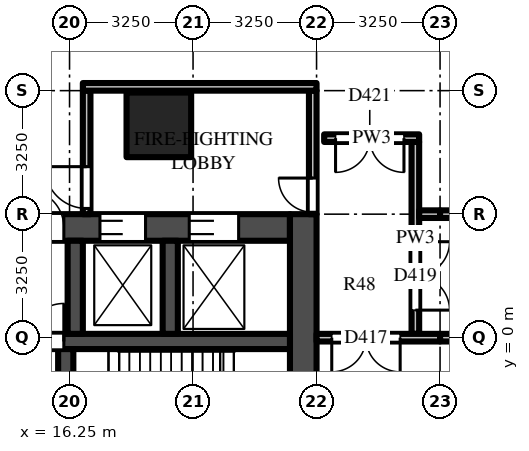
"""IFC4 building model, lengths in metres.
Left out: names, types, materials, properties, quantities, classifications, styles, units other than length and angle.
Written with IfcOpenShell. Run it as: python <this file> out.ifc"""

import sys

from ifc_helpers import new_model, si_unit, direction, frame, frame_2d, origin, origin_2d, place, context, subcontext, project, spatial, rectangle, extrude, source, transform, mapped, element, fill, save


model = new_model("IFC4")
c1 = context("Model", 3, precision=1e-05, world=origin(), true_north=direction((0.0, 1.0)))
c2 = subcontext(c1, "Body", "Model", "MODEL_VIEW")
j1 = project(units=[si_unit("LENGTHUNIT", "METRE"), si_unit("PLANEANGLEUNIT", "RADIAN")], contexts=[c1])
p1 = place(None, origin())
s1 = spatial("IfcSite", under=j1, at=p1, CompositionType="ELEMENT")
p2 = place(p1, origin())
s2 = spatial("IfcBuilding", under=s1, at=p2, CompositionType="ELEMENT")
p3 = place(p2, origin())
s3 = spatial("IfcBuildingStorey", under=s2, at=p3, CompositionType="ELEMENT", Elevation=0.0)
m1 = source(origin(), c2, "Body", "SweptSolid", [
    extrude(rectangle(XDim=1.7, YDim=1.7, at=origin_2d()), origin(), (0.0, 0.0, 1.0), 8.5),
])
p4 = place(p3, frame((18.6, 5.6, -0.5), z_axis=(0.0, 0.0, 1.0), x_axis=(1.0, 0.0, 0.0)))
e1 = element("IfcColumn", 1, at=p4, inside=s3, PredefinedType="COLUMN", context=c2, shape_type="MappedRepresentation", body=[
    mapped(m1, transform((0.0, 0.0, 0.0))),
])
p5 = place(p3, frame((7.2, 2.9, 0.0), z_axis=(0.0, 0.0, 1.0), x_axis=(1.0, 0.0, 0.0)))
e2 = element("IfcWall", 2, at=p5, inside=s3, PredefinedType="SHEAR", context=c2, shape_type="SweptSolid", body=[
    extrude(rectangle(XDim=14.85, YDim=0.7, at=frame_2d((7.425, 0.0))), origin(), (0.0, 0.0, 1.0), 7.7),
])
m2 = source(origin(), c2, "Body", "SweptSolid", [
    extrude(rectangle(XDim=1.3, YDim=2.1, at=frame_2d((0.65, 1.05))), frame((0.0, 0.36, 0.0), z_axis=(0.0, -1.0, 0.0), x_axis=(1.0, 0.0, 0.0)), (0.0, 0.0, 1.0), 0.72),
])
p6 = place(p5, frame((12.2, 0.0, 0.0)))
e3 = element("IfcOpeningElement", 3, at=p6, cuts=e2, PredefinedType="OPENING", context=c2, shape_type="MappedRepresentation", body=[
    mapped(m2, transform((0.0, 0.0, 0.0))),
])
m3 = source(origin(), c2, "Body", "SweptSolid", [
    extrude(rectangle(XDim=1.2, YDim=2.1, at=frame_2d((0.6, 1.05))), frame((0.0, 0.36, 0.0), z_axis=(0.0, -1.0, 0.0), x_axis=(1.0, 0.0, 0.0)), (0.0, 0.0, 1.0), 0.72),
])
p7 = place(p5, frame((9.85, 0.0, 0.0)))
e4 = element("IfcOpeningElement", 4, at=p7, cuts=e2, PredefinedType="OPENING", context=c2, shape_type="MappedRepresentation", body=[
    mapped(m3, transform((0.0, 0.0, 0.0))),
])
m4 = source(origin(), c2, "Body", "SweptSolid", [
    extrude(rectangle(XDim=1.0, YDim=2.1, at=frame_2d((0.5, 1.05))), frame((0.0, 0.36, 0.0), z_axis=(0.0, -1.0, 0.0), x_axis=(1.0, 0.0, 0.0)), (0.0, 0.0, 1.0), 0.72),
])
p8 = place(p5, frame((7.9, 0.0, 0.0)))
e5 = element("IfcOpeningElement", 5, at=p8, cuts=e2, PredefinedType="OPENING", context=c2, shape_type="MappedRepresentation", body=[
    mapped(m4, transform((0.0, 0.0, 0.0))),
])
p9 = place(p5, frame((0.6, 0.0, 0.0)))
e6 = element("IfcOpeningElement", 6, at=p9, cuts=e2, PredefinedType="OPENING", context=c2, shape_type="MappedRepresentation", body=[
    mapped(m4, transform((0.0, 0.0, 0.0))),
])
m5 = source(origin(), c2, "Body", "SweptSolid", [
    extrude(rectangle(XDim=0.9, YDim=2.1, at=frame_2d((0.45, 1.05))), frame((0.0, 0.36, 0.0), z_axis=(0.0, -1.0, 0.0), x_axis=(1.0, 0.0, 0.0)), (0.0, 0.0, 1.0), 0.72),
])
p10 = place(p5, frame((3.25, 0.0, 0.0)))
e7 = element("IfcOpeningElement", 7, at=p10, cuts=e2, PredefinedType="OPENING", context=c2, shape_type="MappedRepresentation", body=[
    mapped(m5, transform((0.0, 0.0, 0.0))),
])
p11 = place(p5, frame((5.85, 0.0, 0.0)))
e8 = element("IfcOpeningElement", 8, at=p11, cuts=e2, PredefinedType="OPENING", context=c2, shape_type="MappedRepresentation", body=[
    mapped(m5, transform((0.0, 0.0, 0.0))),
])
m6 = source(origin(), c2, "Body", "SweptSolid", [
    extrude(rectangle(XDim=9.05, YDim=0.7, at=frame_2d((4.525, 0.0))), origin(), (0.0, 0.0, 1.0), 7.7),
])
p12 = place(p3, frame((22.4, -5.8, 0.0), z_axis=(0.0, 0.0, 1.0), x_axis=(0.0, 1.0, 0.0)))
e9 = element("IfcWall", 9, at=p12, inside=s3, PredefinedType="SHEAR", context=c2, shape_type="MappedRepresentation", body=[
    mapped(m6, transform((0.0, 0.0, 0.0))),
])
m7 = source(origin(), c2, "Body", "SweptSolid", [
    extrude(rectangle(XDim=14.85, YDim=0.4, at=frame_2d((7.425, 0.0))), origin(), (0.0, 0.0, 1.0), 7.7),
])
p13 = place(p3, frame((7.2, -0.1, 0.0), z_axis=(0.0, 0.0, 1.0), x_axis=(1.0, 0.0, 0.0)))
e10 = element("IfcWall", 10, at=p13, inside=s3, PredefinedType="SHEAR", context=c2, shape_type="MappedRepresentation", body=[
    mapped(m7, transform((0.0, 0.0, 0.0))),
])
m8 = source(origin(), c2, "Body", "SweptSolid", [
    extrude(rectangle(XDim=1.0, YDim=2.1, at=frame_2d((0.5, 1.05))), frame((0.0, 0.21, 0.0), z_axis=(0.0, -1.0, 0.0), x_axis=(1.0, 0.0, 0.0)), (0.0, 0.0, 1.0), 0.42),
])
p14 = place(p13, frame((7.9, 0.0, 0.0)))
e11 = element("IfcOpeningElement", 11, at=p14, cuts=e10, PredefinedType="OPENING", context=c2, shape_type="MappedRepresentation", body=[
    mapped(m8, transform((0.0, 0.0, 0.0))),
])
m9 = source(origin(), c2, "Body", "SweptSolid", [
    extrude(rectangle(XDim=5.5, YDim=0.4, at=frame_2d((2.75, 0.0))), origin(), (0.0, 0.0, 1.0), 7.7),
])
p15 = place(p3, frame((16.15, -5.8, 0.0), z_axis=(0.0, 0.0, 1.0), x_axis=(0.0, 1.0, 0.0)))
e12 = element("IfcWall", 12, at=p15, inside=s3, PredefinedType="SHEAR", context=c2, shape_type="MappedRepresentation", body=[
    mapped(m9, transform((0.0, 0.0, 0.0))),
])
m10 = source(origin(), c2, "Body", "SweptSolid", [
    extrude(rectangle(XDim=1.1, YDim=2.1, at=frame_2d((0.55, 1.05))), frame((0.0, 0.21, 0.0), z_axis=(0.0, -1.0, 0.0), x_axis=(1.0, 0.0, 0.0)), (0.0, 0.0, 1.0), 0.42),
])
p16 = place(p15, frame((0.725, 0.0, 0.0)))
e13 = element("IfcOpeningElement", 13, at=p16, cuts=e12, PredefinedType="OPENING", context=c2, shape_type="MappedRepresentation", body=[
    mapped(m10, transform((0.0, 0.0, 0.0))),
])
p17 = place(p15, frame((3.675, 0.0, 0.0)))
e14 = element("IfcOpeningElement", 14, at=p17, cuts=e12, PredefinedType="OPENING", context=c2, shape_type="MappedRepresentation", body=[
    mapped(m10, transform((0.0, 0.0, 0.0))),
])
m11 = source(origin(), c2, "Body", "SweptSolid", [
    extrude(rectangle(XDim=2.45, YDim=0.4, at=frame_2d((1.225, 0.0))), origin(), (0.0, 0.0, 1.0), 7.7),
])
for number, where, z_axis, x_axis in (
    (15, (16.4, 0.1, 0.0), (0.0, 0.0, 1.0), (0.0, 1.0, 0.0)),
    (16, (18.9, 0.1, 0.0), (0.0, 0.0, 1.0), (0.0, 1.0, 0.0)),
):
    element("IfcWall", number, at=place(p3, frame(where, z_axis=z_axis, x_axis=x_axis)), inside=s3, PredefinedType="SHEAR", context=c2, shape_type="MappedRepresentation", body=[
        mapped(m11, transform((0.0, 0.0, 0.0))),
    ])
m12 = source(origin(), c2, "Body", "SweptSolid", [
    extrude(rectangle(XDim=3.25, YDim=0.2, at=frame_2d((1.625, 0.0))), origin(), (0.0, 0.0, 1.0), 7.7),
])
p18 = place(p3, frame((16.7, 3.25, 0.0), z_axis=(0.0, 0.0, 1.0), x_axis=(0.0, 1.0, 0.0)))
e17 = element("IfcWall", 17, at=p18, inside=s3, PredefinedType="PARTITIONING", context=c2, shape_type="MappedRepresentation", body=[
    mapped(m12, transform((0.0, 0.0, 0.0))),
])
m13 = source(origin(), c2, "Body", "SweptSolid", [
    extrude(rectangle(XDim=1.1, YDim=2.1, at=frame_2d((0.55, 1.05))), frame((0.0, 0.11, 0.0), z_axis=(0.0, -1.0, 0.0), x_axis=(1.0, 0.0, 0.0)), (0.0, 0.0, 1.0), 0.22),
])
p19 = place(p18, frame((0.15, 0.0, 0.0)))
e18 = element("IfcOpeningElement", 18, at=p19, cuts=e17, PredefinedType="OPENING", context=c2, shape_type="MappedRepresentation", body=[
    mapped(m13, transform((0.0, 0.0, 0.0))),
])
p20 = place(p3, frame((22.65, 3.25, 0.0), z_axis=(0.0, 0.0, 1.0), x_axis=(0.0, 1.0, 0.0)))
e19 = element("IfcWall", 19, at=p20, inside=s3, PredefinedType="PARTITIONING", context=c2, shape_type="MappedRepresentation", body=[
    mapped(m12, transform((0.0, 0.0, 0.0))),
])
m14 = source(origin(), c2, "Body", "SweptSolid", [
    extrude(rectangle(XDim=0.9, YDim=2.1, at=frame_2d((0.45, 1.05))), frame((0.0, 0.11, 0.0), z_axis=(0.0, -1.0, 0.0), x_axis=(1.0, 0.0, 0.0)), (0.0, 0.0, 1.0), 0.22),
])
p21 = place(p20, frame((0.05, 0.0, 0.0)))
e20 = element("IfcOpeningElement", 20, at=p21, cuts=e19, PredefinedType="OPENING", context=c2, shape_type="MappedRepresentation", body=[
    mapped(m14, transform((0.0, 0.0, 0.0))),
])
m15 = source(origin(), c2, "Body", "SweptSolid", [
    extrude(rectangle(XDim=6.15, YDim=0.2, at=frame_2d((3.075, 0.0))), origin(), (0.0, 0.0, 1.0), 7.7),
])
p22 = place(p3, frame((16.6, 6.6, 0.0), z_axis=(0.0, 0.0, 1.0), x_axis=(1.0, 0.0, 0.0)))
e21 = element("IfcWall", 21, at=p22, inside=s3, PredefinedType="PARTITIONING", context=c2, shape_type="MappedRepresentation", body=[
    mapped(m15, transform((0.0, 0.0, 0.0))),
])
m16 = source(origin(), c2, "Body", "SweptSolid", [
    extrude(rectangle(XDim=5.05, YDim=0.2, at=frame_2d((2.525, 0.0))), origin(), (0.0, 0.0, 1.0), 7.077),
])
p23 = place(p3, frame((25.35, 5.15, 0.0), z_axis=(0.0, 0.0, 1.0), x_axis=(0.0, -1.0, 0.0)))
e22 = element("IfcWall", 22, at=p23, inside=s3, PredefinedType="PARTITIONING", context=c2, shape_type="MappedRepresentation", body=[
    mapped(m16, transform((0.0, 0.0, 0.0))),
])
m17 = source(origin(), c2, "Body", "SweptSolid", [
    extrude(rectangle(XDim=1.8, YDim=2.1, at=frame_2d((0.9, 1.05))), frame((0.0, 0.11, 0.0), z_axis=(0.0, -1.0, 0.0), x_axis=(1.0, 0.0, 0.0)), (0.0, 0.0, 1.0), 0.22),
])
p24 = place(p23, frame((2.625, 0.0, 0.0)))
e23 = element("IfcOpeningElement", 23, at=p24, cuts=e22, PredefinedType="OPENING", context=c2, shape_type="MappedRepresentation", body=[
    mapped(m17, transform((0.0, 0.0, 0.0))),
])
m18 = source(origin(), c2, "Body", "SweptSolid", [
    extrude(rectangle(XDim=3.25, YDim=0.2, at=frame_2d((1.625, 0.0))), origin(), (0.0, 0.0, 1.0), 7.077),
])
p25 = place(p3, frame((26.0, 0.0, 0.0), z_axis=(0.0, 0.0, 1.0), x_axis=(-1.0, 0.0, 0.0)))
e24 = element("IfcWall", 24, at=p25, inside=s3, PredefinedType="PARTITIONING", context=c2, shape_type="MappedRepresentation", body=[
    mapped(m18, transform((0.0, 0.0, 0.0))),
])
p26 = place(p25, frame((1.05, 0.0, 0.0)))
e25 = element("IfcOpeningElement", 25, at=p26, cuts=e24, PredefinedType="OPENING", context=c2, shape_type="MappedRepresentation", body=[
    mapped(m17, transform((0.0, 0.0, 0.0))),
])
m19 = source(origin(), c2, "Body", "SweptSolid", [
    extrude(rectangle(XDim=6.5, YDim=0.2, at=frame_2d((3.25, 0.0))), origin(), (0.0, 0.0, 1.0), 6.918),
])
p27 = place(p3, frame((32.5, 0.0, 0.0), z_axis=(0.0, 0.0, 1.0), x_axis=(-1.0, 0.0, 0.0)))
e26 = element("IfcWall", 26, at=p27, inside=s3, PredefinedType="PARTITIONING", context=c2, shape_type="MappedRepresentation", body=[
    mapped(m19, transform((0.0, 0.0, 0.0))),
])
m20 = source(origin(), c2, "Body", "SweptSolid", [
    extrude(rectangle(XDim=0.55, YDim=0.2, at=frame_2d((0.275, 0.0))), origin(), (0.0, 0.0, 1.0), 7.7),
])
p28 = place(p3, frame((25.45, 3.25, 0.0), z_axis=(0.0, 0.0, 1.0), x_axis=(1.0, 0.0, 0.0)))
e27 = element("IfcWall", 27, at=p28, inside=s3, PredefinedType="PARTITIONING", context=c2, shape_type="MappedRepresentation", body=[
    mapped(m20, transform((0.0, 0.0, 0.0))),
])
p29 = place(p3, frame((26.0, 3.25, 0.0), z_axis=(0.0, 0.0, 1.0), x_axis=(1.0, 0.0, 0.0)))
e28 = element("IfcWall", 28, at=p29, inside=s3, PredefinedType="PARTITIONING", context=c2, shape_type="MappedRepresentation", body=[
    mapped(m19, transform((0.0, 0.0, 0.0))),
])
m21 = source(origin(), c2, "Body", "SweptSolid", [
    extrude(rectangle(XDim=2.5, YDim=0.2, at=frame_2d((1.25, 0.0))), origin(), (0.0, 0.0, 1.0), 7.7),
])
p30 = place(p3, frame((25.45, 5.25, 0.0), z_axis=(0.0, 0.0, 1.0), x_axis=(-1.0, 0.0, 0.0)))
e29 = element("IfcWall", 29, at=p30, inside=s3, PredefinedType="PARTITIONING", context=c2, shape_type="MappedRepresentation", body=[
    mapped(m21, transform((0.0, 0.0, 0.0))),
])
p31 = place(p30, frame((0.4, 0.0, 0.0)))
e30 = element("IfcOpeningElement", 30, at=p31, cuts=e29, PredefinedType="OPENING", context=c2, shape_type="MappedRepresentation", body=[
    mapped(m17, transform((0.0, 0.0, 0.0))),
])
m22 = source(origin(), c2, "Body", "SweptSolid", [
    extrude(rectangle(XDim=1.3, YDim=2.1, at=frame_2d((0.65, 1.05))), frame((0.0, -0.275, 0.0), z_axis=(0.0, -1.0, 0.0), x_axis=(1.0, 0.0, 0.0)), (0.0, 0.0, 1.0), 0.05),
])
p32 = place(p6, origin())
e31 = element("IfcDoor", 31, at=p32, inside=s3, OperationType="DOUBLE_DOOR_SLIDING", PredefinedType="DOOR", context=c2, shape_type="MappedRepresentation", body=[
    mapped(m22, transform((0.0, 0.0, 0.0))),
])
fill(e3, e31)
m23 = source(origin(), c2, "Body", "SweptSolid", [
    extrude(rectangle(XDim=1.2, YDim=2.1, at=frame_2d((0.6, 1.05))), frame((0.0, -0.275, 0.0), z_axis=(0.0, -1.0, 0.0), x_axis=(1.0, 0.0, 0.0)), (0.0, 0.0, 1.0), 0.05),
])
p33 = place(p7, origin())
e32 = element("IfcDoor", 32, at=p33, inside=s3, OperationType="DOUBLE_DOOR_SLIDING", PredefinedType="DOOR", context=c2, shape_type="MappedRepresentation", body=[
    mapped(m23, transform((0.0, 0.0, 0.0))),
])
fill(e4, e32)
m24 = source(origin(), c2, "Body", "SweptSolid", [
    extrude(rectangle(XDim=1.0, YDim=2.1, at=frame_2d((0.5, 1.05))), frame((0.0, 0.025, 0.0), z_axis=(0.0, -1.0, 0.0), x_axis=(1.0, 0.0, 0.0)), (0.0, 0.0, 1.0), 0.05),
])
p34 = place(p14, origin())
e33 = element("IfcDoor", 33, at=p34, inside=s3, OperationType="SINGLE_SWING_RIGHT", PredefinedType="DOOR", context=c2, shape_type="MappedRepresentation", body=[
    mapped(m24, transform((0.0, 0.0, 0.0))),
])
fill(e11, e33)
m25 = source(origin(), c2, "Body", "SweptSolid", [
    extrude(rectangle(XDim=1.0, YDim=2.1, at=frame_2d((0.5, 1.05))), frame((0.0, -0.275, 0.0), z_axis=(0.0, -1.0, 0.0), x_axis=(1.0, 0.0, 0.0)), (0.0, 0.0, 1.0), 0.05),
])
p35 = place(p8, origin())
e34 = element("IfcDoor", 34, at=p35, inside=s3, OperationType="SINGLE_SWING_LEFT", PredefinedType="DOOR", context=c2, shape_type="MappedRepresentation", body=[
    mapped(m25, transform((0.0, 0.0, 0.0))),
])
fill(e5, e34)
m26 = source(origin(), c2, "Body", "SweptSolid", [
    extrude(rectangle(XDim=1.1, YDim=2.1, at=frame_2d((0.55, 1.05))), frame((0.0, 0.025, 0.0), z_axis=(0.0, -1.0, 0.0), x_axis=(1.0, 0.0, 0.0)), (0.0, 0.0, 1.0), 0.05),
])
p36 = place(p19, origin())
e35 = element("IfcDoor", 35, at=p36, inside=s3, OperationType="SINGLE_SWING_RIGHT", PredefinedType="DOOR", context=c2, shape_type="MappedRepresentation", body=[
    mapped(m26, transform((0.0, 0.0, 0.0))),
])
fill(e18, e35)
m27 = source(origin(), c2, "Body", "SweptSolid", [
    extrude(rectangle(XDim=0.9, YDim=2.1, at=frame_2d((0.45, 1.05))), frame((0.0, 0.025, 0.0), z_axis=(0.0, -1.0, 0.0), x_axis=(1.0, 0.0, 0.0)), (0.0, 0.0, 1.0), 0.05),
])
p37 = place(p21, origin())
e36 = element("IfcDoor", 36, at=p37, inside=s3, OperationType="SINGLE_SWING_RIGHT", PredefinedType="DOOR", context=c2, shape_type="MappedRepresentation", body=[
    mapped(m27, transform((0.0, 0.0, 0.0))),
])
fill(e20, e36)
m28 = source(origin(), c2, "Body", "SweptSolid", [
    extrude(rectangle(XDim=1.8, YDim=2.1, at=frame_2d((0.9, 1.05))), frame((0.0, 0.025, 0.0), z_axis=(0.0, -1.0, 0.0), x_axis=(1.0, 0.0, 0.0)), (0.0, 0.0, 1.0), 0.05),
])
p38 = place(p26, origin())
e37 = element("IfcDoor", 37, at=p38, inside=s3, OperationType="DOUBLE_DOOR_SINGLE_SWING", PredefinedType="DOOR", context=c2, shape_type="MappedRepresentation", body=[
    mapped(m28, transform((0.0, 0.0, 0.0))),
])
fill(e25, e37)
p39 = place(p24, origin())
e38 = element("IfcDoor", 38, at=p39, inside=s3, OperationType="DOUBLE_DOOR_SINGLE_SWING", PredefinedType="DOOR", context=c2, shape_type="MappedRepresentation", body=[
    mapped(m28, transform((0.0, 0.0, 0.0))),
])
fill(e23, e38)
p40 = place(p31, origin())
e39 = element("IfcDoor", 39, at=p40, inside=s3, OperationType="DOUBLE_DOOR_SINGLE_SWING", PredefinedType="DOOR", context=c2, shape_type="MappedRepresentation", body=[
    mapped(m28, transform((0.0, 0.0, 0.0))),
])
fill(e30, e39)
save(model, sys.argv[1])
